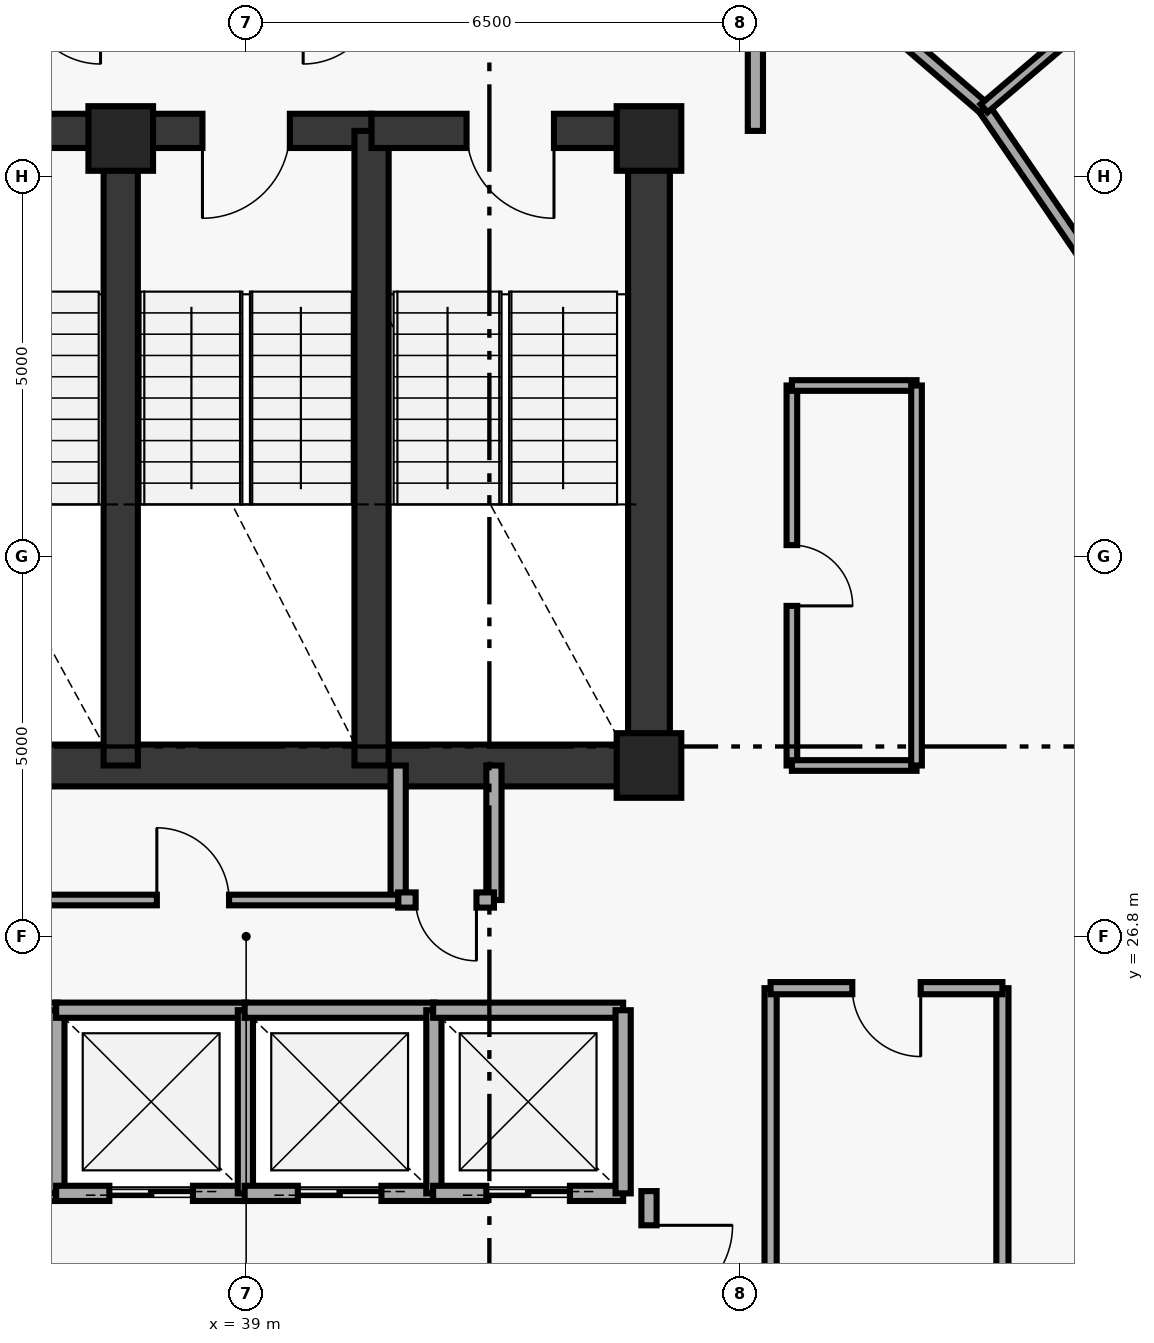
"""IFC4 building model, lengths in metres.
Left out: names, types, materials, properties, quantities, classifications, styles, units other than length and angle.
Written with IfcOpenShell. Run it as: python <this file> out.ifc"""

import sys

from ifc_helpers import new_model, si_unit, direction, frame, frame_2d, origin, origin_2d, place, context, subcontext, project, spatial, rectangle, extrude, element, fill, save


model = new_model("IFC4")
c1 = context("Model", 3, precision=1e-05, world=origin(), true_north=direction((0.0, 1.0)))
c2 = subcontext(c1, "Body", "Model", "MODEL_VIEW")
j1 = project(units=[si_unit("LENGTHUNIT", "METRE"), si_unit("PLANEANGLEUNIT", "RADIAN")], contexts=[c1])
p1 = place(None, origin())
s1 = spatial("IfcSite", under=j1, at=p1, CompositionType="ELEMENT")
p2 = place(p1, origin())
s2 = spatial("IfcBuilding", under=s1, at=p2, CompositionType="ELEMENT")
p3 = place(p2, frame((0.0, 0.0, 251.95)))
s3 = spatial("IfcBuildingStorey", under=s2, at=p3, CompositionType="ELEMENT", Elevation=251.95)
for number, where, z_axis, x_axis in (
    (1, (44.3, 29.05, 0.0), (0.0, 0.0, 1.0), (1.0, 0.0, 0.0)),
    (2, (44.3, 37.3, 0.0), (0.0, 0.0, 1.0), (1.0, 0.0, 0.0)),
    (3, (37.35, 37.3, 0.0), (0.0, 0.0, 1.0), (1.0, 0.0, 0.0)),
):
    element("IfcColumn", number, at=place(p3, frame(where, z_axis=z_axis, x_axis=x_axis)), inside=s3, PredefinedType="PILASTER", context=c2, shape_type="SweptSolid", body=[
        extrude(rectangle(XDim=0.85, YDim=0.85, at=origin_2d()), origin(), (0.0, 0.0, 1.0), 3.39),
    ])
p4 = place(p3, frame((44.3, 29.05, 0.0), z_axis=(0.0, 0.0, 1.0), x_axis=(0.0, 1.0, 0.0)))
e4 = element("IfcWall", 4, at=p4, inside=s3, PredefinedType="SHEAR", context=c2, shape_type="SweptSolid", body=[
    extrude(rectangle(XDim=8.35, YDim=0.55, at=frame_2d((4.175, 0.0))), origin(), (0.0, 0.0, 1.0), 3.39),
])
p5 = place(p3, frame((33.7, 29.05, 0.0), z_axis=(0.0, 0.0, 1.0), x_axis=(1.0, 0.0, 0.0)))
e5 = element("IfcWall", 5, at=p5, inside=s3, PredefinedType="SHEAR", context=c2, shape_type="SweptSolid", body=[
    extrude(rectangle(XDim=10.6, YDim=0.55, at=frame_2d((5.3, 0.0))), origin(), (0.0, 0.0, 1.0), 3.39),
])
p6 = place(p3, frame((37.35, 37.4, 0.0), z_axis=(0.0, 0.0, 1.0), x_axis=(-1.0, 0.0, 0.0)))
e6 = element("IfcWall", 6, at=p6, inside=s3, PredefinedType="SHEAR", context=c2, shape_type="SweptSolid", body=[
    extrude(rectangle(XDim=3.65, YDim=0.45, at=frame_2d((1.825, 0.0))), origin(), (0.0, 0.0, 1.0), 3.39),
])
p7 = place(p6, frame((1.25, 0.0, 0.0)))
e7 = element("IfcOpeningElement", 7, at=p7, cuts=e6, PredefinedType="OPENING", context=c2, shape_type="SweptSolid", body=[
    extrude(rectangle(XDim=1.15, YDim=2.15, at=frame_2d((0.575, 1.075))), frame((0.0, 0.235, 0.0), z_axis=(0.0, -1.0, 0.0), x_axis=(1.0, 0.0, 0.0)), (0.0, 0.0, 1.0), 0.47),
])
p8 = place(p3, frame((37.35, 29.05, 0.0), z_axis=(0.0, 0.0, 1.0), x_axis=(0.0, 1.0, 0.0)))
e8 = element("IfcWall", 8, at=p8, inside=s3, PredefinedType="SHEAR", context=c2, shape_type="SweptSolid", body=[
    extrude(rectangle(XDim=8.35, YDim=0.45, at=frame_2d((4.175, 0.0))), origin(), (0.0, 0.0, 1.0), 3.39),
])
p9 = place(p3, frame((40.65, 37.4, 0.0), z_axis=(0.0, 0.0, 1.0), x_axis=(-1.0, 0.0, 0.0)))
e9 = element("IfcWall", 9, at=p9, inside=s3, PredefinedType="SHEAR", context=c2, shape_type="SweptSolid", body=[
    extrude(rectangle(XDim=3.3, YDim=0.45, at=frame_2d((1.65, 0.0))), origin(), (0.0, 0.0, 1.0), 3.39),
])
p10 = place(p9, frame((1.075, 0.0, 0.0)))
e10 = element("IfcOpeningElement", 10, at=p10, cuts=e9, PredefinedType="OPENING", context=c2, shape_type="SweptSolid", body=[
    extrude(rectangle(XDim=1.15, YDim=2.15, at=frame_2d((0.575, 1.075))), frame((0.0, 0.235, 0.0), z_axis=(0.0, -1.0, 0.0), x_axis=(1.0, 0.0, 0.0)), (0.0, 0.0, 1.0), 0.47),
])
p11 = place(p3, frame((40.65, 29.05, 0.0), z_axis=(0.0, 0.0, 1.0), x_axis=(0.0, 1.0, 0.0)))
e11 = element("IfcWall", 11, at=p11, inside=s3, PredefinedType="SHEAR", context=c2, shape_type="SweptSolid", body=[
    extrude(rectangle(XDim=8.35, YDim=0.45, at=frame_2d((4.175, 0.0))), origin(), (0.0, 0.0, 1.0), 3.39),
])
p12 = place(p3, frame((44.3, 37.4, 0.0), z_axis=(0.0, 0.0, 1.0), x_axis=(-1.0, 0.0, 0.0)))
e12 = element("IfcWall", 12, at=p12, inside=s3, PredefinedType="SHEAR", context=c2, shape_type="SweptSolid", body=[
    extrude(rectangle(XDim=3.65, YDim=0.45, at=frame_2d((1.825, 0.0))), origin(), (0.0, 0.0, 1.0), 3.39),
])
p13 = place(p12, frame((1.25, 0.0, 0.0)))
e13 = element("IfcOpeningElement", 13, at=p13, cuts=e12, PredefinedType="OPENING", context=c2, shape_type="SweptSolid", body=[
    extrude(rectangle(XDim=1.15, YDim=2.15, at=frame_2d((0.575, 1.075))), frame((0.0, 0.235, 0.0), z_axis=(0.0, -1.0, 0.0), x_axis=(1.0, 0.0, 0.0)), (0.0, 0.0, 1.0), 0.47),
])
p14 = place(p3, frame((45.7, 37.4, 0.0), z_axis=(0.0, 0.0, 1.0), x_axis=(0.0, 1.0, 0.0)))
e14 = element("IfcWall", 14, at=p14, inside=s3, PredefinedType="SOLIDWALL", context=c2, shape_type="SweptSolid", body=[
    extrude(rectangle(XDim=1.88, YDim=0.2, at=frame_2d((0.94, 0.0))), origin(), (0.0, 0.0, 1.0), 3.39),
])
for number, where, z_axis, x_axis in (
    (15, (41.0, 27.28, 0.0), (0.0, 0.0, 1.0), (0.0, 1.0, 0.0)),
    (16, (42.26, 27.28, 0.0), (0.0, 0.0, 1.0), (0.0, 1.0, 0.0)),
):
    element("IfcWall", number, at=place(p3, frame(where, z_axis=z_axis, x_axis=x_axis)), inside=s3, PredefinedType="SOLIDWALL", context=c2, shape_type="SweptSolid", body=[
        extrude(rectangle(XDim=1.77, YDim=0.2, at=frame_2d((0.885, 0.0))), origin(), (0.0, 0.0, 1.0), 3.39),
    ])
p15 = place(p3, frame((41.0, 27.28, 0.0), z_axis=(0.0, 0.0, 1.0), x_axis=(1.0, 0.0, 0.0)))
e17 = element("IfcWall", 17, at=p15, inside=s3, PredefinedType="SOLIDWALL", context=c2, shape_type="SweptSolid", body=[
    extrude(rectangle(XDim=1.26, YDim=0.2, at=frame_2d((0.63, 0.0))), origin(), (0.0, 0.0, 1.0), 3.39),
])
p16 = place(p15, frame((0.23, 0.0, 0.0)))
e18 = element("IfcOpeningElement", 18, at=p16, cuts=e17, PredefinedType="OPENING", context=c2, shape_type="SweptSolid", body=[
    extrude(rectangle(XDim=0.8, YDim=2.05, at=frame_2d((0.4, 1.025))), frame((0.0, 0.11, 0.0), z_axis=(0.0, -1.0, 0.0), x_axis=(1.0, 0.0, 0.0)), (0.0, 0.0, 1.0), 0.22),
])
p17 = place(p3, frame((34.02, 23.42, 0.0), z_axis=(0.0, 0.0, 1.0), x_axis=(1.0, 0.0, 0.0)))
e19 = element("IfcWall", 19, at=p17, inside=s3, PredefinedType="SOLIDWALL", context=c2, shape_type="SweptSolid", body=[
    extrude(rectangle(XDim=2.5, YDim=0.2, at=frame_2d((1.25, 0.0))), origin(), (0.0, 0.0, 1.0), 3.39),
])
p18 = place(p17, frame((0.7, 0.0, 0.0)))
e20 = element("IfcOpeningElement", 20, at=p18, cuts=e19, PredefinedType="OPENING", context=c2, shape_type="SweptSolid", body=[
    extrude(rectangle(XDim=1.1, YDim=2.15, at=frame_2d((0.55, 1.075))), frame((0.0, 0.11, 0.0), z_axis=(0.0, -1.0, 0.0), x_axis=(1.0, 0.0, 0.0)), (0.0, 0.0, 1.0), 0.22),
])
p19 = place(p3, frame((34.02, 25.83, 0.0), z_axis=(0.0, 0.0, 1.0), x_axis=(1.0, 0.0, 0.0)))
e21 = element("IfcWall", 21, at=p19, inside=s3, PredefinedType="SOLIDWALL", context=c2, shape_type="SweptSolid", body=[
    extrude(rectangle(XDim=2.5, YDim=0.2, at=frame_2d((1.25, 0.0))), origin(), (0.0, 0.0, 1.0), 3.39),
])
p20 = place(p3, frame((36.51, 23.42, 0.0), z_axis=(0.0, 0.0, 1.0), x_axis=(0.0, 1.0, 0.0)))
e22 = element("IfcWall", 22, at=p20, inside=s3, PredefinedType="SOLIDWALL", context=c2, shape_type="SweptSolid", body=[
    extrude(rectangle(XDim=2.41, YDim=0.2, at=frame_2d((1.205, 0.0))), origin(), (0.0, 0.0, 1.0), 3.39),
])
p21 = place(p3, frame((36.5, 23.42, 0.0), z_axis=(0.0, 0.0, 1.0), x_axis=(1.0, 0.0, 0.0)))
e23 = element("IfcWall", 23, at=p21, inside=s3, PredefinedType="SOLIDWALL", context=c2, shape_type="SweptSolid", body=[
    extrude(rectangle(XDim=2.5, YDim=0.2, at=frame_2d((1.25, 0.0))), origin(), (0.0, 0.0, 1.0), 3.39),
])
p22 = place(p21, frame((0.7, 0.0, 0.0)))
e24 = element("IfcOpeningElement", 24, at=p22, cuts=e23, PredefinedType="OPENING", context=c2, shape_type="SweptSolid", body=[
    extrude(rectangle(XDim=1.1, YDim=2.15, at=frame_2d((0.55, 1.075))), frame((0.0, 0.11, 0.0), z_axis=(0.0, -1.0, 0.0), x_axis=(1.0, 0.0, 0.0)), (0.0, 0.0, 1.0), 0.22),
])
p23 = place(p3, frame((36.5, 25.83, 0.0), z_axis=(0.0, 0.0, 1.0), x_axis=(1.0, 0.0, 0.0)))
e25 = element("IfcWall", 25, at=p23, inside=s3, PredefinedType="SOLIDWALL", context=c2, shape_type="SweptSolid", body=[
    extrude(rectangle(XDim=2.5, YDim=0.2, at=frame_2d((1.25, 0.0))), origin(), (0.0, 0.0, 1.0), 3.39),
])
p24 = place(p3, frame((38.99, 23.42, 0.0), z_axis=(0.0, 0.0, 1.0), x_axis=(0.0, 1.0, 0.0)))
e26 = element("IfcWall", 26, at=p24, inside=s3, PredefinedType="SOLIDWALL", context=c2, shape_type="SweptSolid", body=[
    extrude(rectangle(XDim=2.41, YDim=0.2, at=frame_2d((1.205, 0.0))), origin(), (0.0, 0.0, 1.0), 3.39),
])
p25 = place(p3, frame((38.98, 23.42, 0.0), z_axis=(0.0, 0.0, 1.0), x_axis=(1.0, 0.0, 0.0)))
e27 = element("IfcWall", 27, at=p25, inside=s3, PredefinedType="SOLIDWALL", context=c2, shape_type="SweptSolid", body=[
    extrude(rectangle(XDim=2.5, YDim=0.2, at=frame_2d((1.25, 0.0))), origin(), (0.0, 0.0, 1.0), 3.39),
])
p26 = place(p25, frame((0.7, 0.0, 0.0)))
e28 = element("IfcOpeningElement", 28, at=p26, cuts=e27, PredefinedType="OPENING", context=c2, shape_type="SweptSolid", body=[
    extrude(rectangle(XDim=1.1, YDim=2.15, at=frame_2d((0.55, 1.075))), frame((0.0, 0.11, 0.0), z_axis=(0.0, -1.0, 0.0), x_axis=(1.0, 0.0, 0.0)), (0.0, 0.0, 1.0), 0.22),
])
p27 = place(p3, frame((38.98, 25.83, 0.0), z_axis=(0.0, 0.0, 1.0), x_axis=(1.0, 0.0, 0.0)))
e29 = element("IfcWall", 29, at=p27, inside=s3, PredefinedType="SOLIDWALL", context=c2, shape_type="SweptSolid", body=[
    extrude(rectangle(XDim=2.5, YDim=0.2, at=frame_2d((1.25, 0.0))), origin(), (0.0, 0.0, 1.0), 3.39),
])
p28 = place(p3, frame((41.47, 23.42, 0.0), z_axis=(0.0, 0.0, 1.0), x_axis=(0.0, 1.0, 0.0)))
e30 = element("IfcWall", 30, at=p28, inside=s3, PredefinedType="SOLIDWALL", context=c2, shape_type="SweptSolid", body=[
    extrude(rectangle(XDim=2.41, YDim=0.2, at=frame_2d((1.205, 0.0))), origin(), (0.0, 0.0, 1.0), 3.39),
])
p29 = place(p3, frame((41.46, 23.42, 0.0), z_axis=(0.0, 0.0, 1.0), x_axis=(1.0, 0.0, 0.0)))
e31 = element("IfcWall", 31, at=p29, inside=s3, PredefinedType="SOLIDWALL", context=c2, shape_type="SweptSolid", body=[
    extrude(rectangle(XDim=2.5, YDim=0.2, at=frame_2d((1.25, 0.0))), origin(), (0.0, 0.0, 1.0), 3.39),
])
p30 = place(p29, frame((0.7, 0.0, 0.0)))
e32 = element("IfcOpeningElement", 32, at=p30, cuts=e31, PredefinedType="OPENING", context=c2, shape_type="SweptSolid", body=[
    extrude(rectangle(XDim=1.1, YDim=2.15, at=frame_2d((0.55, 1.075))), frame((0.0, 0.11, 0.0), z_axis=(0.0, -1.0, 0.0), x_axis=(1.0, 0.0, 0.0)), (0.0, 0.0, 1.0), 0.22),
])
p31 = place(p3, frame((41.46, 25.83, 0.0), z_axis=(0.0, 0.0, 1.0), x_axis=(1.0, 0.0, 0.0)))
e33 = element("IfcWall", 33, at=p31, inside=s3, PredefinedType="SOLIDWALL", context=c2, shape_type="SweptSolid", body=[
    extrude(rectangle(XDim=2.5, YDim=0.2, at=frame_2d((1.25, 0.0))), origin(), (0.0, 0.0, 1.0), 3.39),
])
p32 = place(p3, frame((43.96, 23.42, 0.0), z_axis=(0.0, 0.0, 1.0), x_axis=(0.0, 1.0, 0.0)))
e34 = element("IfcWall", 34, at=p32, inside=s3, PredefinedType="SOLIDWALL", context=c2, shape_type="SweptSolid", body=[
    extrude(rectangle(XDim=2.41, YDim=0.2, at=frame_2d((1.205, 0.0))), origin(), (0.0, 0.0, 1.0), 3.39),
])
for number, where, z_axis, x_axis in (
    (35, (48.95, 19.05, 0.0), (0.0, 0.0, 1.0), (0.0, 1.0, 0.0)),
    (36, (45.9, 19.05, 0.0), (0.0, 0.0, 1.0), (0.0, 1.0, 0.0)),
):
    element("IfcWall", number, at=place(p3, frame(where, z_axis=z_axis, x_axis=x_axis)), inside=s3, PredefinedType="PARTITIONING", context=c2, shape_type="SweptSolid", body=[
        extrude(rectangle(XDim=7.07, YDim=0.16, at=frame_2d((3.535, 0.0))), origin(), (0.0, 0.0, 1.0), 3.39),
    ])
p33 = place(p3, frame((48.95, 26.12, 0.0), z_axis=(0.0, 0.0, 1.0), x_axis=(-1.0, 0.0, 0.0)))
e37 = element("IfcWall", 37, at=p33, inside=s3, PredefinedType="PARTITIONING", context=c2, shape_type="SweptSolid", body=[
    extrude(rectangle(XDim=3.05, YDim=0.16, at=frame_2d((1.525, 0.0))), origin(), (0.0, 0.0, 1.0), 3.39),
])
p34 = place(p33, frame((1.075, 0.0, 0.0)))
e38 = element("IfcOpeningElement", 38, at=p34, cuts=e37, PredefinedType="OPENING", context=c2, shape_type="SweptSolid", body=[
    extrude(rectangle(XDim=0.9, YDim=2.02, at=frame_2d((0.45, 1.01))), frame((0.0, 0.09, 0.0), z_axis=(0.0, -1.0, 0.0), x_axis=(1.0, 0.0, 0.0)), (0.0, 0.0, 1.0), 0.18),
])
p35 = place(p3, frame((44.3, 21.35, 0.0), z_axis=(0.0, 0.0, 1.0), x_axis=(0.0, 1.0, 0.0)))
e39 = element("IfcWall", 39, at=p35, inside=s3, PredefinedType="SOLIDWALL", context=c2, shape_type="SweptSolid", body=[
    extrude(rectangle(XDim=2.1, YDim=0.2, at=frame_2d((1.05, 0.0))), origin(), (0.0, 0.0, 1.0), 2.775),
])
p36 = place(p35, frame((0.55, 0.0, 0.0)))
e40 = element("IfcOpeningElement", 40, at=p36, cuts=e39, PredefinedType="OPENING", context=c2, shape_type="SweptSolid", body=[
    extrude(rectangle(XDim=1.1, YDim=2.15, at=frame_2d((0.55, 1.075))), frame((0.0, 0.11, 0.0), z_axis=(0.0, -1.0, 0.0), x_axis=(1.0, 0.0, 0.0)), (0.0, 0.0, 1.0), 0.22),
])
p37 = place(p3, frame((35.6, 27.28, 0.0), z_axis=(0.0, 0.0, 1.0), x_axis=(1.0, 0.0, 0.0)))
e41 = element("IfcWall", 41, at=p37, inside=s3, PredefinedType="PARTITIONING", context=c2, shape_type="SweptSolid", body=[
    extrude(rectangle(XDim=5.4, YDim=0.14, at=frame_2d((2.7, 0.0))), origin(), (0.0, 0.0, 1.0), 3.39),
])
p38 = place(p37, frame((2.225, 0.0, 0.0)))
e42 = element("IfcOpeningElement", 42, at=p38, cuts=e41, PredefinedType="OPENING", context=c2, shape_type="SweptSolid", body=[
    extrude(rectangle(XDim=0.95, YDim=2.1, at=frame_2d((0.475, 1.05))), frame((0.0, 0.08, 0.0), z_axis=(0.0, -1.0, 0.0), x_axis=(1.0, 0.0, 0.0)), (0.0, 0.0, 1.0), 0.16),
])
p39 = place(p3, frame((46.18, 34.05, 0.0), z_axis=(0.0, 0.0, 1.0), x_axis=(0.0, -1.0, 0.0)))
e43 = element("IfcWall", 43, at=p39, inside=s3, PredefinedType="PARTITIONING", context=c2, shape_type="SweptSolid", body=[
    extrude(rectangle(XDim=5.0, YDim=0.14, at=frame_2d((2.5, 0.0))), origin(), (0.0, 0.0, 1.0), 3.39),
])
p40 = place(p39, frame((2.1, 0.0, 0.0)))
e44 = element("IfcOpeningElement", 44, at=p40, cuts=e43, PredefinedType="OPENING", context=c2, shape_type="SweptSolid", body=[
    extrude(rectangle(XDim=0.8, YDim=2.05, at=frame_2d((0.4, 1.025))), frame((0.0, 0.08, 0.0), z_axis=(0.0, -1.0, 0.0), x_axis=(1.0, 0.0, 0.0)), (0.0, 0.0, 1.0), 0.16),
])
for number, where, z_axis, x_axis in (
    (45, (46.18, 29.05, 0.0), (0.0, 0.0, 1.0), (1.0, 0.0, 0.0)),
    (46, (46.18, 34.05, 0.0), (0.0, 0.0, 1.0), (1.0, 0.0, 0.0)),
):
    element("IfcWall", number, at=place(p3, frame(where, z_axis=z_axis, x_axis=x_axis)), inside=s3, PredefinedType="PARTITIONING", context=c2, shape_type="SweptSolid", body=[
        extrude(rectangle(XDim=1.64, YDim=0.14, at=frame_2d((0.82, 0.0))), origin(), (0.0, 0.0, 1.0), 3.39),
    ])
p41 = place(p3, frame((47.82, 29.05, 0.0), z_axis=(0.0, 0.0, 1.0), x_axis=(0.0, 1.0, 0.0)))
e47 = element("IfcWall", 47, at=p41, inside=s3, PredefinedType="PARTITIONING", context=c2, shape_type="SweptSolid", body=[
    extrude(rectangle(XDim=5.0, YDim=0.14, at=frame_2d((2.5, 0.0))), origin(), (0.0, 0.0, 1.0), 3.39),
])
p42 = place(p3, frame((50.891, 34.505, 0.0), z_axis=(0.0, 0.0, 1.0), x_axis=(-0.5643375537, 0.825544139028, 0.0)))
e48 = element("IfcWall", 48, at=p42, inside=s3, PredefinedType="PARTITIONING", context=c2, shape_type="SweptSolid", body=[
    extrude(rectangle(XDim=3.867, YDim=0.16, at=frame_2d((1.933, 0.0))), origin(), (0.0, 0.0, 1.0), 3.39),
])
p43 = place(p3, frame((48.709, 37.697, 0.0), z_axis=(0.0, 0.0, 1.0), x_axis=(-0.75790014932, 0.652370572344, 0.0)))
e49 = element("IfcWall", 49, at=p43, inside=s3, PredefinedType="PARTITIONING", context=c2, shape_type="SweptSolid", body=[
    extrude(rectangle(XDim=3.752, YDim=0.16, at=frame_2d((1.876, 0.0))), origin(), (0.0, 0.0, 1.0), 3.39),
])
p44 = place(p3, frame((48.709, 37.697, 0.0), z_axis=(0.0, 0.0, 1.0), x_axis=(0.7611095579, 0.648623342837, 0.0)))
e50 = element("IfcWall", 50, at=p44, inside=s3, PredefinedType="PARTITIONING", context=c2, shape_type="SweptSolid", body=[
    extrude(rectangle(XDim=2.071, YDim=0.14, at=frame_2d((1.035, 0.0))), origin(), (0.0, 0.0, 1.0), 3.39),
])
p45 = place(p10, origin())
e51 = element("IfcDoor", 51, at=p45, inside=s3, OperationType="SINGLE_SWING_RIGHT", PredefinedType="DOOR", context=c2, shape_type="SweptSolid", body=[
    extrude(rectangle(XDim=1.15, YDim=2.15, at=frame_2d((0.575, 1.075))), frame((0.0, 0.025, 0.0), z_axis=(0.0, -1.0, 0.0), x_axis=(1.0, 0.0, 0.0)), (0.0, 0.0, 1.0), 0.05),
])
fill(e10, e51)
p46 = place(p13, origin())
e52 = element("IfcDoor", 52, at=p46, inside=s3, OperationType="SINGLE_SWING_LEFT", PredefinedType="DOOR", context=c2, shape_type="SweptSolid", body=[
    extrude(rectangle(XDim=1.15, YDim=2.15, at=frame_2d((0.575, 1.075))), frame((0.0, 0.025, 0.0), z_axis=(0.0, -1.0, 0.0), x_axis=(1.0, 0.0, 0.0)), (0.0, 0.0, 1.0), 0.05),
])
fill(e13, e52)
p47 = place(p16, origin())
e53 = element("IfcDoor", 53, at=p47, inside=s3, OperationType="SINGLE_SWING_RIGHT", PredefinedType="DOOR", context=c2, shape_type="SweptSolid", body=[
    extrude(rectangle(XDim=0.8, YDim=2.05, at=frame_2d((0.4, 1.025))), frame((0.0, 0.025, 0.0), z_axis=(0.0, -1.0, 0.0), x_axis=(1.0, 0.0, 0.0)), (0.0, 0.0, 1.0), 0.05),
])
fill(e18, e53)
p48 = place(p22, origin())
e54 = element("IfcDoor", 54, at=p48, inside=s3, OperationType="DOUBLE_DOOR_SLIDING", PredefinedType="DOOR", context=c2, shape_type="SweptSolid", body=[
    extrude(rectangle(XDim=1.1, YDim=2.15, at=frame_2d((0.55, 1.075))), frame((0.0, 0.025, 0.0), z_axis=(0.0, -1.0, 0.0), x_axis=(1.0, 0.0, 0.0)), (0.0, 0.0, 1.0), 0.05),
])
fill(e24, e54)
p49 = place(p26, origin())
e55 = element("IfcDoor", 55, at=p49, inside=s3, OperationType="DOUBLE_DOOR_SLIDING", PredefinedType="DOOR", context=c2, shape_type="SweptSolid", body=[
    extrude(rectangle(XDim=1.1, YDim=2.15, at=frame_2d((0.55, 1.075))), frame((0.0, 0.025, 0.0), z_axis=(0.0, -1.0, 0.0), x_axis=(1.0, 0.0, 0.0)), (0.0, 0.0, 1.0), 0.05),
])
fill(e28, e55)
p50 = place(p30, origin())
e56 = element("IfcDoor", 56, at=p50, inside=s3, OperationType="DOUBLE_DOOR_SLIDING", PredefinedType="DOOR", context=c2, shape_type="SweptSolid", body=[
    extrude(rectangle(XDim=1.1, YDim=2.15, at=frame_2d((0.55, 1.075))), frame((0.0, 0.025, 0.0), z_axis=(0.0, -1.0, 0.0), x_axis=(1.0, 0.0, 0.0)), (0.0, 0.0, 1.0), 0.05),
])
fill(e32, e56)
p51 = place(p34, origin())
e57 = element("IfcDoor", 57, at=p51, inside=s3, OperationType="SINGLE_SWING_LEFT", PredefinedType="DOOR", context=c2, shape_type="SweptSolid", body=[
    extrude(rectangle(XDim=0.9, YDim=2.02, at=frame_2d((0.45, 1.01))), frame((0.0, 0.025, 0.0), z_axis=(0.0, -1.0, 0.0), x_axis=(1.0, 0.0, 0.0)), (0.0, 0.0, 1.0), 0.05),
])
fill(e38, e57)
p52 = place(p36, origin())
e58 = element("IfcDoor", 58, at=p52, inside=s3, OperationType="SINGLE_SWING_RIGHT", PredefinedType="DOOR", context=c2, shape_type="SweptSolid", body=[
    extrude(rectangle(XDim=1.1, YDim=2.15, at=frame_2d((0.55, 1.075))), frame((0.0, 0.025, 0.0), z_axis=(0.0, -1.0, 0.0), x_axis=(1.0, 0.0, 0.0)), (0.0, 0.0, 1.0), 0.05),
])
fill(e40, e58)
p53 = place(p38, origin())
e59 = element("IfcDoor", 59, at=p53, inside=s3, OperationType="SINGLE_SWING_LEFT", PredefinedType="DOOR", context=c2, shape_type="SweptSolid", body=[
    extrude(rectangle(XDim=0.95, YDim=2.1, at=frame_2d((0.475, 1.05))), frame((0.0, 0.025, 0.0), z_axis=(0.0, -1.0, 0.0), x_axis=(1.0, 0.0, 0.0)), (0.0, 0.0, 1.0), 0.05),
])
fill(e42, e59)
p54 = place(p40, origin())
e60 = element("IfcDoor", 60, at=p54, inside=s3, OperationType="SINGLE_SWING_RIGHT", PredefinedType="DOOR", context=c2, shape_type="SweptSolid", body=[
    extrude(rectangle(XDim=0.8, YDim=2.05, at=frame_2d((0.4, 1.025))), frame((0.0, 0.025, 0.0), z_axis=(0.0, -1.0, 0.0), x_axis=(1.0, 0.0, 0.0)), (0.0, 0.0, 1.0), 0.05),
])
fill(e44, e60)
save(model, sys.argv[1])
